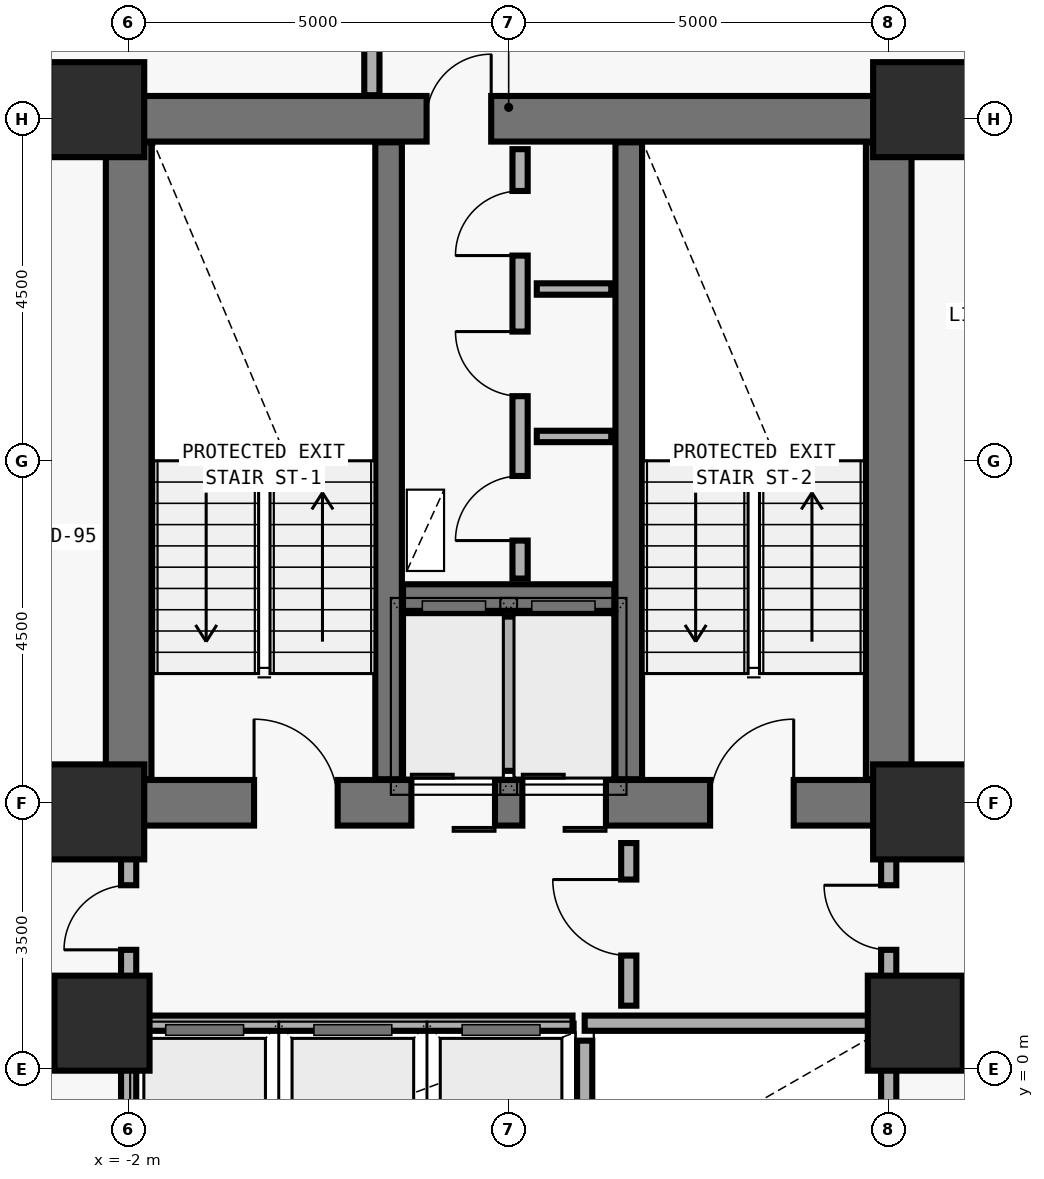
"""IFC4 building model, lengths in metres.
Left out: names, types, materials, properties, quantities, classifications, styles, units other than length and angle.
Written with IfcOpenShell. Run it as: python <this file> out.ifc"""

import sys

from ifc_helpers import new_model, si_unit, direction, frame, frame_2d, origin, origin_2d, place, context, subcontext, project, spatial, rectangle, extrude, element, fill, save


model = new_model("IFC4")
c1 = context("Model", 3, precision=1e-05, world=origin(), true_north=direction((0.0, 1.0)))
c2 = subcontext(c1, "Body", "Model", "MODEL_VIEW")
j1 = project(units=[si_unit("LENGTHUNIT", "METRE"), si_unit("PLANEANGLEUNIT", "RADIAN")], contexts=[c1])
p1 = place(None, origin())
s1 = spatial("IfcSite", under=j1, at=p1, CompositionType="ELEMENT")
p2 = place(p1, origin())
s2 = spatial("IfcBuilding", under=s1, at=p2, CompositionType="ELEMENT")
p3 = place(p2, frame((0.0, 0.0, 51.0)))
s3 = spatial("IfcBuildingStorey", under=s2, at=p3, CompositionType="ELEMENT", Elevation=51.0)
p4 = place(p3, frame((-2.0, 3.5, 0.0), z_axis=(0.0, 0.0, 1.0), x_axis=(1.0, 0.0, 0.0)))
e1 = element("IfcWall", 1, at=p4, inside=s3, PredefinedType="SHEAR", context=c2, shape_type="SweptSolid", body=[
    extrude(rectangle(XDim=10.0, YDim=0.6, at=frame_2d((5.0, 0.0))), origin(), (0.0, 0.0, 1.0), 3.892),
])
p5 = place(p4, frame((1.65, 0.0, 0.0)))
e2 = element("IfcOpeningElement", 2, at=p5, cuts=e1, PredefinedType="OPENING", context=c2, shape_type="SweptSolid", body=[
    extrude(rectangle(XDim=1.1, YDim=2.15, at=frame_2d((0.55, 1.075))), frame((0.0, 0.31, 0.0), z_axis=(0.0, -1.0, 0.0), x_axis=(1.0, 0.0, 0.0)), (0.0, 0.0, 1.0), 0.62),
])
p6 = place(p4, frame((7.65, 0.0, 0.0)))
e3 = element("IfcOpeningElement", 3, at=p6, cuts=e1, PredefinedType="OPENING", context=c2, shape_type="SweptSolid", body=[
    extrude(rectangle(XDim=1.1, YDim=2.15, at=frame_2d((0.55, 1.075))), frame((0.0, 0.31, 0.0), z_axis=(0.0, -1.0, 0.0), x_axis=(1.0, 0.0, 0.0)), (0.0, 0.0, 1.0), 0.62),
])
p7 = place(p4, frame((3.72, 0.0, 0.0)))
e4 = element("IfcOpeningElement", 4, at=p7, cuts=e1, PredefinedType="OPENING", context=c2, shape_type="SweptSolid", body=[
    extrude(rectangle(XDim=1.1, YDim=2.2, at=frame_2d((0.55, 1.1))), frame((0.0, 0.31, 0.0), z_axis=(0.0, -1.0, 0.0), x_axis=(1.0, 0.0, 0.0)), (0.0, 0.0, 1.0), 0.62),
])
p8 = place(p4, frame((5.18, 0.0, 0.0)))
e5 = element("IfcOpeningElement", 5, at=p8, cuts=e1, PredefinedType="OPENING", context=c2, shape_type="SweptSolid", body=[
    extrude(rectangle(XDim=1.1, YDim=2.2, at=frame_2d((0.55, 1.1))), frame((0.0, 0.31, 0.0), z_axis=(0.0, -1.0, 0.0), x_axis=(1.0, 0.0, 0.0)), (0.0, 0.0, 1.0), 0.62),
])
p9 = place(p3, frame((-2.0, 12.5, 0.0), z_axis=(0.0, 0.0, 1.0), x_axis=(1.0, 0.0, 0.0)))
e6 = element("IfcWall", 6, at=p9, inside=s3, PredefinedType="SHEAR", context=c2, shape_type="SweptSolid", body=[
    extrude(rectangle(XDim=10.0, YDim=0.6, at=frame_2d((5.0, 0.0))), origin(), (0.0, 0.0, 1.0), 3.892),
])
p10 = place(p9, frame((3.92, 0.0, 0.0)))
e7 = element("IfcOpeningElement", 7, at=p10, cuts=e6, PredefinedType="OPENING", context=c2, shape_type="SweptSolid", body=[
    extrude(rectangle(XDim=0.85, YDim=2.1, at=frame_2d((0.425, 1.05))), frame((0.0, 0.31, 0.0), z_axis=(0.0, -1.0, 0.0), x_axis=(1.0, 0.0, 0.0)), (0.0, 0.0, 1.0), 0.62),
])
for number, where, z_axis, x_axis in (
    (8, (-2.0, 3.81, 0.0), (0.0, 0.0, 1.0), (0.0, 1.0, 0.0)),
    (9, (8.0, 3.81, 0.0), (0.0, 0.0, 1.0), (0.0, 1.0, 0.0)),
):
    element("IfcWall", number, at=place(p3, frame(where, z_axis=z_axis, x_axis=x_axis)), inside=s3, PredefinedType="SHEAR", context=c2, shape_type="SweptSolid", body=[
        extrude(rectangle(XDim=8.38, YDim=0.6, at=frame_2d((4.19, 0.0))), origin(), (0.0, 0.0, 1.0), 3.892),
    ])
for number, where, z_axis, x_axis in (
    (10, (1.42, 3.81, 0.0), (0.0, 0.0, 1.0), (0.0, 1.0, 0.0)),
    (11, (4.58, 3.81, 0.0), (0.0, 0.0, 1.0), (0.0, 1.0, 0.0)),
):
    element("IfcWall", number, at=place(p3, frame(where, z_axis=z_axis, x_axis=x_axis)), inside=s3, PredefinedType="SHEAR", context=c2, shape_type="SweptSolid", body=[
        extrude(rectangle(XDim=8.38, YDim=0.35, at=frame_2d((4.19, 0.0))), origin(), (0.0, 0.0, 1.0), 3.892),
    ])
p11 = place(p3, frame((1.61, 6.2, 0.0), z_axis=(0.0, 0.0, 1.0), x_axis=(1.0, 0.0, 0.0)))
e12 = element("IfcWall", 12, at=p11, inside=s3, PredefinedType="SHEAR", context=c2, shape_type="SweptSolid", body=[
    extrude(rectangle(XDim=2.78, YDim=0.35, at=frame_2d((1.39, 0.0))), origin(), (0.0, 0.0, 1.0), 3.892),
])
for number, where, z_axis, x_axis in (
    (13, (-2.42, 12.62, 0.0), (0.0, 0.0, 1.0), (1.0, 0.0, 0.0)),
    (14, (8.42, 12.62, 0.0), (0.0, 0.0, 1.0), (1.0, 0.0, 0.0)),
    (15, (-2.42, 3.38, 0.0), (0.0, 0.0, 1.0), (1.0, 0.0, 0.0)),
    (16, (8.42, 3.38, 0.0), (0.0, 0.0, 1.0), (1.0, 0.0, 0.0)),
    (17, (-2.35, 0.6, 0.0), (0.0, 0.0, 1.0), (1.0, 0.0, 0.0)),
    (18, (8.35, 0.6, 0.0), (0.0, 0.0, 1.0), (1.0, 0.0, 0.0)),
):
    element("IfcColumn", number, at=place(p3, frame(where, z_axis=z_axis, x_axis=x_axis)), inside=s3, PredefinedType="COLUMN", context=c2, shape_type="SweptSolid", body=[
        extrude(rectangle(XDim=1.25, YDim=1.25, at=origin_2d()), origin(), (0.0, 0.0, 1.0), 3.875),
    ])
p12 = place(p3, frame((3.0, 3.92, 0.0), z_axis=(0.0, 0.0, 1.0), x_axis=(0.0, 1.0, 0.0)))
e19 = element("IfcWall", 19, at=p12, inside=s3, PredefinedType="SOLIDWALL", context=c2, shape_type="SweptSolid", body=[
    extrude(rectangle(XDim=2.03, YDim=0.2, at=frame_2d((1.015, 0.0))), origin(), (0.0, 0.0, 1.0), 3.64),
])
p13 = place(p3, frame((4.0, 0.6, 0.0), z_axis=(0.0, 0.0, 1.0), x_axis=(1.0, 0.0, 0.0)))
e20 = element("IfcWall", 20, at=p13, inside=s3, PredefinedType="SOLIDWALL", context=c2, shape_type="SweptSolid", body=[
    extrude(rectangle(XDim=3.88, YDim=0.2, at=frame_2d((1.94, 0.0))), origin(), (0.0, 0.0, 1.0), 3.122),
])
p14 = place(p3, frame((-2.0, -1.57, 0.0), z_axis=(0.0, 0.0, 1.0), x_axis=(0.0, 1.0, 0.0)))
e21 = element("IfcWall", 21, at=p14, inside=s3, PredefinedType="SOLIDWALL", context=c2, shape_type="SweptSolid", body=[
    extrude(rectangle(XDim=2.05, YDim=0.2, at=frame_2d((1.025, 0.0))), origin(), (0.0, 0.0, 1.0), 3.022),
])
p15 = place(p3, frame((4.0, -1.57, 0.0), z_axis=(0.0, 0.0, 1.0), x_axis=(0.0, 1.0, 0.0)))
e22 = element("IfcWall", 22, at=p15, inside=s3, PredefinedType="SOLIDWALL", context=c2, shape_type="SweptSolid", body=[
    extrude(rectangle(XDim=1.94, YDim=0.2, at=frame_2d((0.97, 0.0))), origin(), (0.0, 0.0, 1.0), 3.64),
])
p16 = place(p3, frame((8.0, -1.57, 0.0), z_axis=(0.0, 0.0, 1.0), x_axis=(0.0, 1.0, 0.0)))
e23 = element("IfcWall", 23, at=p16, inside=s3, PredefinedType="SOLIDWALL", context=c2, shape_type="SweptSolid", body=[
    extrude(rectangle(XDim=2.05, YDim=0.2, at=frame_2d((1.025, 0.0))), origin(), (0.0, 0.0, 1.0), 3.072),
])
p17 = place(p3, frame((3.15, 6.45, 0.0), z_axis=(0.0, 0.0, 1.0), x_axis=(0.0, 1.0, 0.0)))
e24 = element("IfcWall", 24, at=p17, inside=s3, PredefinedType="MOVABLE", context=c2, shape_type="SweptSolid", body=[
    extrude(rectangle(XDim=5.65, YDim=0.2, at=frame_2d((2.825, 0.0))), origin(), (0.0, 0.0, 1.0), 3.64),
])
p18 = place(p17, frame((0.5, 0.0, 0.0)))
e25 = element("IfcOpeningElement", 25, at=p18, cuts=e24, PredefinedType="OPENING", context=c2, shape_type="SweptSolid", body=[
    extrude(rectangle(XDim=0.85, YDim=2.1, at=frame_2d((0.425, 1.05))), frame((0.0, 0.11, 0.0), z_axis=(0.0, -1.0, 0.0), x_axis=(1.0, 0.0, 0.0)), (0.0, 0.0, 1.0), 0.22),
])
p19 = place(p17, frame((2.4, 0.0, 0.0)))
e26 = element("IfcOpeningElement", 26, at=p19, cuts=e24, PredefinedType="OPENING", context=c2, shape_type="SweptSolid", body=[
    extrude(rectangle(XDim=0.85, YDim=2.1, at=frame_2d((0.425, 1.05))), frame((0.0, 0.11, 0.0), z_axis=(0.0, -1.0, 0.0), x_axis=(1.0, 0.0, 0.0)), (0.0, 0.0, 1.0), 0.22),
])
p20 = place(p17, frame((4.25, 0.0, 0.0)))
e27 = element("IfcOpeningElement", 27, at=p20, cuts=e24, PredefinedType="OPENING", context=c2, shape_type="SweptSolid", body=[
    extrude(rectangle(XDim=0.85, YDim=2.1, at=frame_2d((0.425, 1.05))), frame((0.0, 0.11, 0.0), z_axis=(0.0, -1.0, 0.0), x_axis=(1.0, 0.0, 0.0)), (0.0, 0.0, 1.0), 0.22),
])
p21 = place(p3, frame((4.58, 0.83, 0.0), z_axis=(0.0, 0.0, 1.0), x_axis=(0.0, 1.0, 0.0)))
e28 = element("IfcWall", 28, at=p21, inside=s3, PredefinedType="MOVABLE", context=c2, shape_type="SweptSolid", body=[
    extrude(rectangle(XDim=2.14, YDim=0.2, at=frame_2d((1.07, 0.0))), origin(), (0.0, 0.0, 1.0), 3.64),
])
p22 = place(p21, frame((0.66, 0.0, 0.0)))
e29 = element("IfcOpeningElement", 29, at=p22, cuts=e28, PredefinedType="OPENING", context=c2, shape_type="SweptSolid", body=[
    extrude(rectangle(XDim=1.0, YDim=2.1, at=frame_2d((0.5, 1.05))), frame((0.0, 0.11, 0.0), z_axis=(0.0, -1.0, 0.0), x_axis=(1.0, 0.0, 0.0)), (0.0, 0.0, 1.0), 0.22),
])
p23 = place(p3, frame((-2.0, 0.72, 0.0), z_axis=(0.0, 0.0, 1.0), x_axis=(0.0, 1.0, 0.0)))
e30 = element("IfcWall", 30, at=p23, inside=s3, PredefinedType="MOVABLE", context=c2, shape_type="SweptSolid", body=[
    extrude(rectangle(XDim=2.25, YDim=0.2, at=frame_2d((1.125, 0.0))), origin(), (0.0, 0.0, 1.0), 2.872),
])
p24 = place(p23, frame((0.845, 0.0, 0.0)))
e31 = element("IfcOpeningElement", 31, at=p24, cuts=e30, PredefinedType="OPENING", context=c2, shape_type="SweptSolid", body=[
    extrude(rectangle(XDim=0.85, YDim=2.1, at=frame_2d((0.425, 1.05))), frame((0.0, 0.11, 0.0), z_axis=(0.0, -1.0, 0.0), x_axis=(1.0, 0.0, 0.0)), (0.0, 0.0, 1.0), 0.22),
])
p25 = place(p3, frame((8.0, 0.72, 0.0), z_axis=(0.0, 0.0, 1.0), x_axis=(0.0, 1.0, 0.0)))
e32 = element("IfcWall", 32, at=p25, inside=s3, PredefinedType="MOVABLE", context=c2, shape_type="SweptSolid", body=[
    extrude(rectangle(XDim=2.25, YDim=0.2, at=frame_2d((1.125, 0.0))), origin(), (0.0, 0.0, 1.0), 2.872),
])
p26 = place(p25, frame((0.845, 0.0, 0.0)))
e33 = element("IfcOpeningElement", 33, at=p26, cuts=e32, PredefinedType="OPENING", context=c2, shape_type="SweptSolid", body=[
    extrude(rectangle(XDim=0.85, YDim=2.1, at=frame_2d((0.425, 1.05))), frame((0.0, 0.11, 0.0), z_axis=(0.0, -1.0, 0.0), x_axis=(1.0, 0.0, 0.0)), (0.0, 0.0, 1.0), 0.22),
])
for number, where, z_axis, x_axis in (
    (34, (3.37, 8.32, 0.0), (0.0, 0.0, 1.0), (1.0, 0.0, 0.0)),
    (35, (3.37, 10.26, 0.0), (0.0, 0.0, 1.0), (1.0, 0.0, 0.0)),
):
    element("IfcWall", number, at=place(p3, frame(where, z_axis=z_axis, x_axis=x_axis)), inside=s3, PredefinedType="PARTITIONING", context=c2, shape_type="SweptSolid", body=[
        extrude(rectangle(XDim=0.98, YDim=0.15, at=frame_2d((0.49, 0.0))), origin(), (0.0, 0.0, 1.0), 3.64),
    ])
p27 = place(p3, frame((-1.88, 0.6, 0.0), z_axis=(0.0, 0.0, 1.0), x_axis=(1.0, 0.0, 0.0)))
e36 = element("IfcWall", 36, at=p27, inside=s3, PredefinedType="MOVABLE", context=c2, shape_type="SweptSolid", body=[
    extrude(rectangle(XDim=5.72, YDim=0.2, at=frame_2d((2.86, 0.0))), origin(), (0.0, 0.0, 1.0), 3.122),
])
p28 = place(p3, frame((1.2, 14.7, 0.0), z_axis=(0.0, 0.0, 1.0), x_axis=(0.0, -1.0, 0.0)))
e37 = element("IfcWall", 37, at=p28, inside=s3, PredefinedType="MOVABLE", context=c2, shape_type="SweptSolid", body=[
    extrude(rectangle(XDim=1.89, YDim=0.2, at=frame_2d((0.945, 0.0))), origin(), (0.0, 0.0, 1.0), 3.64),
])
p29 = place(p5, origin())
e38 = element("IfcDoor", 38, at=p29, inside=s3, OperationType="SINGLE_SWING_LEFT", PredefinedType="DOOR", context=c2, shape_type="SweptSolid", body=[
    extrude(rectangle(XDim=1.1, YDim=2.15, at=frame_2d((0.55, 1.075))), frame((0.0, 0.025, 0.0), z_axis=(0.0, -1.0, 0.0), x_axis=(1.0, 0.0, 0.0)), (0.0, 0.0, 1.0), 0.05),
])
fill(e2, e38)
p30 = place(p6, origin())
e39 = element("IfcDoor", 39, at=p30, inside=s3, OperationType="SINGLE_SWING_RIGHT", PredefinedType="DOOR", context=c2, shape_type="SweptSolid", body=[
    extrude(rectangle(XDim=1.1, YDim=2.15, at=frame_2d((0.55, 1.075))), frame((0.0, 0.025, 0.0), z_axis=(0.0, -1.0, 0.0), x_axis=(1.0, 0.0, 0.0)), (0.0, 0.0, 1.0), 0.05),
])
fill(e3, e39)
p31 = place(p7, origin())
e40 = element("IfcDoor", 40, at=p31, inside=s3, OperationType="DOUBLE_DOOR_SLIDING", PredefinedType="DOOR", context=c2, shape_type="SweptSolid", body=[
    extrude(rectangle(XDim=1.1, YDim=2.2, at=frame_2d((0.55, 1.1))), frame((0.0, 0.025, 0.0), z_axis=(0.0, -1.0, 0.0), x_axis=(1.0, 0.0, 0.0)), (0.0, 0.0, 1.0), 0.05),
])
fill(e4, e40)
p32 = place(p8, origin())
e41 = element("IfcDoor", 41, at=p32, inside=s3, OperationType="DOUBLE_DOOR_SLIDING", PredefinedType="DOOR", context=c2, shape_type="SweptSolid", body=[
    extrude(rectangle(XDim=1.1, YDim=2.2, at=frame_2d((0.55, 1.1))), frame((0.0, 0.025, 0.0), z_axis=(0.0, -1.0, 0.0), x_axis=(1.0, 0.0, 0.0)), (0.0, 0.0, 1.0), 0.05),
])
fill(e5, e41)
p33 = place(p10, origin())
e42 = element("IfcDoor", 42, at=p33, inside=s3, OperationType="SINGLE_SWING_RIGHT", PredefinedType="DOOR", context=c2, shape_type="SweptSolid", body=[
    extrude(rectangle(XDim=0.85, YDim=2.1, at=frame_2d((0.425, 1.05))), frame((0.0, 0.025, 0.0), z_axis=(0.0, -1.0, 0.0), x_axis=(1.0, 0.0, 0.0)), (0.0, 0.0, 1.0), 0.05),
])
fill(e7, e42)
p34 = place(p18, origin())
e43 = element("IfcDoor", 43, at=p34, inside=s3, OperationType="SINGLE_SWING_LEFT", PredefinedType="DOOR", context=c2, shape_type="SweptSolid", body=[
    extrude(rectangle(XDim=0.85, YDim=2.1, at=frame_2d((0.425, 1.05))), frame((0.0, 0.025, 0.0), z_axis=(0.0, -1.0, 0.0), x_axis=(1.0, 0.0, 0.0)), (0.0, 0.0, 1.0), 0.05),
])
fill(e25, e43)
p35 = place(p19, origin())
e44 = element("IfcDoor", 44, at=p35, inside=s3, OperationType="SINGLE_SWING_RIGHT", PredefinedType="DOOR", context=c2, shape_type="SweptSolid", body=[
    extrude(rectangle(XDim=0.85, YDim=2.1, at=frame_2d((0.425, 1.05))), frame((0.0, 0.025, 0.0), z_axis=(0.0, -1.0, 0.0), x_axis=(1.0, 0.0, 0.0)), (0.0, 0.0, 1.0), 0.05),
])
fill(e26, e44)
p36 = place(p20, origin())
e45 = element("IfcDoor", 45, at=p36, inside=s3, OperationType="SINGLE_SWING_LEFT", PredefinedType="DOOR", context=c2, shape_type="SweptSolid", body=[
    extrude(rectangle(XDim=0.85, YDim=2.1, at=frame_2d((0.425, 1.05))), frame((0.0, 0.025, 0.0), z_axis=(0.0, -1.0, 0.0), x_axis=(1.0, 0.0, 0.0)), (0.0, 0.0, 1.0), 0.05),
])
fill(e27, e45)
p37 = place(p22, origin())
e46 = element("IfcDoor", 46, at=p37, inside=s3, OperationType="SINGLE_SWING_RIGHT", PredefinedType="DOOR", context=c2, shape_type="SweptSolid", body=[
    extrude(rectangle(XDim=1.0, YDim=2.1, at=frame_2d((0.5, 1.05))), frame((0.0, 0.025, 0.0), z_axis=(0.0, -1.0, 0.0), x_axis=(1.0, 0.0, 0.0)), (0.0, 0.0, 1.0), 0.05),
])
fill(e29, e46)
p38 = place(p24, origin())
e47 = element("IfcDoor", 47, at=p38, inside=s3, OperationType="SINGLE_SWING_LEFT", PredefinedType="DOOR", context=c2, shape_type="SweptSolid", body=[
    extrude(rectangle(XDim=0.85, YDim=2.1, at=frame_2d((0.425, 1.05))), frame((0.0, 0.025, 0.0), z_axis=(0.0, -1.0, 0.0), x_axis=(1.0, 0.0, 0.0)), (0.0, 0.0, 1.0), 0.05),
])
fill(e31, e47)
p39 = place(p26, origin())
e48 = element("IfcDoor", 48, at=p39, inside=s3, OperationType="SINGLE_SWING_RIGHT", PredefinedType="DOOR", context=c2, shape_type="SweptSolid", body=[
    extrude(rectangle(XDim=0.85, YDim=2.1, at=frame_2d((0.425, 1.05))), frame((0.0, 0.025, 0.0), z_axis=(0.0, -1.0, 0.0), x_axis=(1.0, 0.0, 0.0)), (0.0, 0.0, 1.0), 0.05),
])
fill(e33, e48)
save(model, sys.argv[1])
